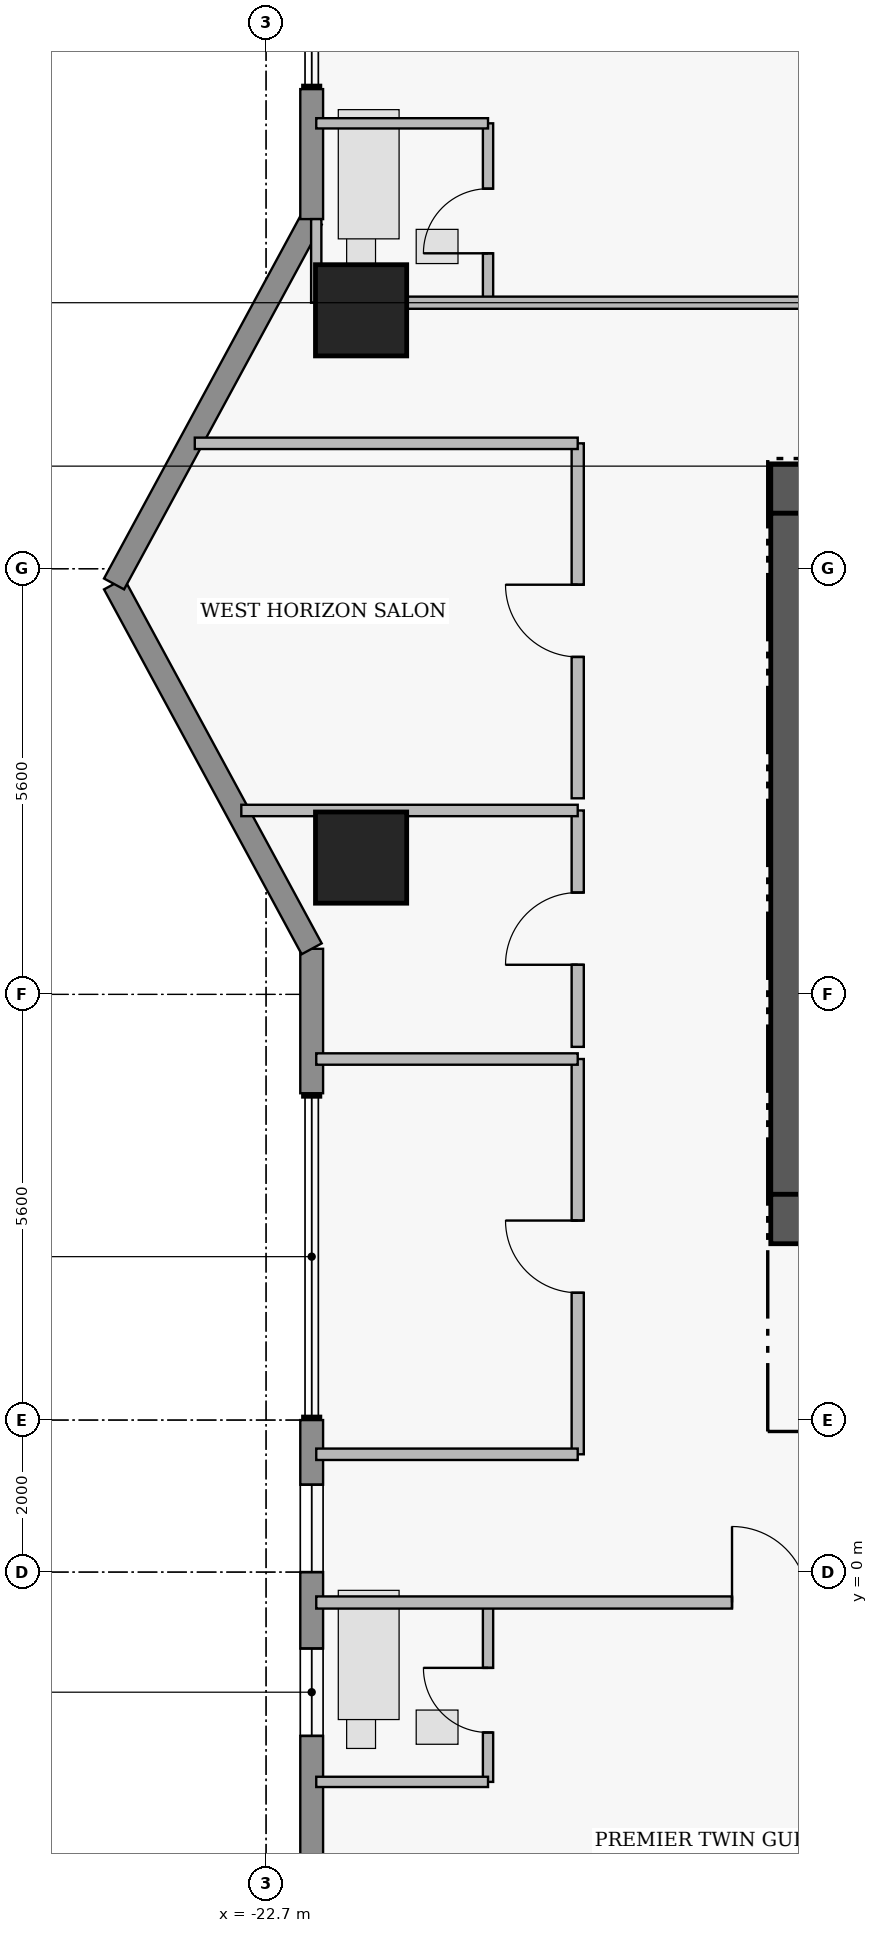
"""IFC4 building model, lengths in metres.
Left out: names, types, materials, properties, quantities, classifications, styles, units other than length and angle.
Written with IfcOpenShell. Run it as: python <this file> out.ifc"""

import sys

from ifc_helpers import new_model, si_unit, direction, frame, frame_2d, origin, origin_2d, place, context, subcontext, project, spatial, rectangle, extrude, element, fill, save


model = new_model("IFC4")
c1 = context("Model", 3, precision=1e-05, world=origin(), true_north=direction((0.0, 1.0)))
c2 = subcontext(c1, "Body", "Model", "MODEL_VIEW")
j1 = project(units=[si_unit("LENGTHUNIT", "METRE"), si_unit("PLANEANGLEUNIT", "RADIAN")], contexts=[c1])
p1 = place(None, origin())
s1 = spatial("IfcSite", under=j1, at=p1, CompositionType="ELEMENT")
p2 = place(p1, origin())
s2 = spatial("IfcBuilding", under=s1, at=p2, CompositionType="ELEMENT")
p3 = place(p2, frame((0.0, 0.0, 188.65)))
s3 = spatial("IfcBuildingStorey", under=s2, at=p3, CompositionType="ELEMENT", Elevation=188.65)
p4 = place(p3, frame((-16.06, 14.255, 0.0), z_axis=(0.0, 0.0, 1.0), x_axis=(1.0, 0.0, 0.0)))
e1 = element("IfcWall", 1, at=p4, inside=s3, PredefinedType="SHEAR", context=c2, shape_type="SweptSolid", body=[
    extrude(rectangle(XDim=4.46, YDim=0.65, at=frame_2d((2.23, 0.0))), origin(), (0.0, 0.0, 1.0), 3.56),
])
p5 = place(p3, frame((-15.735, 4.97, 0.0), z_axis=(0.0, 0.0, 1.0), x_axis=(0.0, 1.0, 0.0)))
e2 = element("IfcWall", 2, at=p5, inside=s3, PredefinedType="SHEAR", context=c2, shape_type="SweptSolid", body=[
    extrude(rectangle(XDim=8.96, YDim=0.65, at=frame_2d((4.48, 0.0))), origin(), (0.0, 0.0, 1.0), 3.56),
])
p6 = place(p3, frame((-16.06, 4.645, 0.0), z_axis=(0.0, 0.0, 1.0), x_axis=(1.0, 0.0, 0.0)))
e3 = element("IfcWall", 3, at=p6, inside=s3, PredefinedType="SHEAR", context=c2, shape_type="SweptSolid", body=[
    extrude(rectangle(XDim=4.46, YDim=0.65, at=frame_2d((2.23, 0.0))), origin(), (0.0, 0.0, 1.0), 3.56),
])
for number, where, z_axis, x_axis in (
    (4, (-21.45, 9.4, 0.0), (0.0, 0.0, 1.0), (1.0, 0.0, 0.0)),
    (5, (-21.45, 16.6, 0.0), (0.0, 0.0, 1.0), (1.0, 0.0, 0.0)),
):
    element("IfcColumn", number, at=place(p3, frame(where, z_axis=z_axis, x_axis=x_axis)), inside=s3, PredefinedType="COLUMN", context=c2, shape_type="SweptSolid", body=[
        extrude(rectangle(XDim=1.2, YDim=1.2, at=origin_2d()), origin(), (0.0, 0.0, 1.0), 3.75),
    ])
p7 = place(p3, frame((-22.1, -4.2, 0.0), z_axis=(0.0, 0.0, 1.0), x_axis=(0.0, 1.0, 0.0)))
e6 = element("IfcWall", 6, at=p7, inside=s3, PredefinedType="STANDARD", context=c2, shape_type="SweptSolid", body=[
    extrude(rectangle(XDim=6.2, YDim=0.3, at=frame_2d((3.1, 0.0))), origin(), (0.0, 0.0, 1.0), 3.53),
])
p8 = place(p7, frame((2.045, 0.0, 0.95)))
e7 = element("IfcOpeningElement", 7, at=p8, cuts=e6, PredefinedType="OPENING", context=c2, shape_type="SweptSolid", body=[
    extrude(rectangle(XDim=1.15, YDim=1.55, at=frame_2d((0.575, 0.775))), frame((0.0, 0.16, 0.0), z_axis=(0.0, -1.0, 0.0), x_axis=(1.0, 0.0, 0.0)), (0.0, 0.0, 1.0), 0.32),
])
p9 = place(p7, frame((4.2, 0.0, 0.95)))
e8 = element("IfcOpeningElement", 8, at=p9, cuts=e6, PredefinedType="OPENING", context=c2, shape_type="SweptSolid", body=[
    extrude(rectangle(XDim=1.15, YDim=1.55, at=frame_2d((0.575, 0.775))), frame((0.0, 0.16, 0.0), z_axis=(0.0, -1.0, 0.0), x_axis=(1.0, 0.0, 0.0)), (0.0, 0.0, 1.0), 0.32),
])
p10 = place(p3, frame((-22.1, 6.3, 0.0), z_axis=(0.0, 0.0, 1.0), x_axis=(0.0, 1.0, 0.0)))
e9 = element("IfcWall", 9, at=p10, inside=s3, PredefinedType="STANDARD", context=c2, shape_type="SweptSolid", body=[
    extrude(rectangle(XDim=1.9, YDim=0.3, at=frame_2d((0.95, 0.0))), origin(), (0.0, 0.0, 1.0), 3.53),
])
for number, where, z_axis, x_axis in (
    (10, (-22.1, 8.2, 0.0), (0.0, 0.0, 1.0), (-0.476, 0.879, 0.0)),
    (11, (-24.7, 13.0, 0.0), (0.0, 0.0, 1.0), (0.476, 0.879, 0.0)),
):
    element("IfcWall", number, at=place(p3, frame(where, z_axis=z_axis, x_axis=x_axis)), inside=s3, PredefinedType="STANDARD", context=c2, shape_type="SweptSolid", body=[
        extrude(rectangle(XDim=5.459, YDim=0.3, at=frame_2d((2.729, 0.0))), origin(), (0.0, 0.0, 1.0), 3.53),
    ])
p11 = place(p3, frame((-22.1, 17.8, 0.0), z_axis=(0.0, 0.0, 1.0), x_axis=(0.0, 1.0, 0.0)))
e12 = element("IfcWall", 12, at=p11, inside=s3, PredefinedType="STANDARD", context=c2, shape_type="SweptSolid", body=[
    extrude(rectangle(XDim=1.71, YDim=0.3, at=frame_2d((0.855, 0.0))), origin(), (0.0, 0.0, 1.0), 3.53),
])
p12 = place(p3, frame((-19.78, 16.7, 0.0), z_axis=(0.0, 0.0, 1.0), x_axis=(0.0, 1.0, 0.0)))
e13 = element("IfcWall", 13, at=p12, inside=s3, PredefinedType="PLUMBINGWALL", context=c2, shape_type="SweptSolid", body=[
    extrude(rectangle(XDim=2.36, YDim=0.135, at=frame_2d((1.18, 0.0))), origin(), (0.0, 0.0, 1.0), 3.53),
])
p13 = place(p12, frame((0.65, 0.0, 0.0)))
e14 = element("IfcOpeningElement", 14, at=p13, cuts=e13, PredefinedType="OPENING", context=c2, shape_type="SweptSolid", body=[
    extrude(rectangle(XDim=0.85, YDim=2.1, at=frame_2d((0.425, 1.05))), frame((0.0, 0.077, 0.0), z_axis=(0.0, -1.0, 0.0), x_axis=(1.0, 0.0, 0.0)), (0.0, 0.0, 1.0), 0.155),
])
p14 = place(p3, frame((-22.04, 16.7, 0.0), z_axis=(0.0, 0.0, 1.0), x_axis=(1.0, 0.0, 0.0)))
e15 = element("IfcWall", 15, at=p14, inside=s3, PredefinedType="PARTITIONING", context=c2, shape_type="SweptSolid", body=[
    extrude(rectangle(XDim=13.29, YDim=0.16, at=frame_2d((6.645, 0.0))), origin(), (0.0, 0.0, 1.0), 3.124),
])
p15 = place(p14, frame((7.39, 0.0, 0.0)))
e16 = element("IfcOpeningElement", 16, at=p15, cuts=e15, PredefinedType="OPENING", context=c2, shape_type="SweptSolid", body=[
    extrude(rectangle(XDim=1.0, YDim=2.15, at=frame_2d((0.5, 1.075))), frame((0.0, 0.09, 0.0), z_axis=(0.0, -1.0, 0.0), x_axis=(1.0, 0.0, 0.0)), (0.0, 0.0, 1.0), 0.18),
])
p16 = place(p3, frame((-19.78, -2.76, 0.0), z_axis=(0.0, 0.0, 1.0), x_axis=(0.0, 1.0, 0.0)))
e17 = element("IfcWall", 17, at=p16, inside=s3, PredefinedType="PLUMBINGWALL", context=c2, shape_type="SweptSolid", body=[
    extrude(rectangle(XDim=2.36, YDim=0.135, at=frame_2d((1.18, 0.0))), origin(), (0.0, 0.0, 1.0), 3.53),
])
p17 = place(p16, frame((0.65, 0.0, 0.0)))
e18 = element("IfcOpeningElement", 18, at=p17, cuts=e17, PredefinedType="OPENING", context=c2, shape_type="SweptSolid", body=[
    extrude(rectangle(XDim=0.85, YDim=2.1, at=frame_2d((0.425, 1.05))), frame((0.0, 0.077, 0.0), z_axis=(0.0, -1.0, 0.0), x_axis=(1.0, 0.0, 0.0)), (0.0, 0.0, 1.0), 0.155),
])
p18 = place(p3, frame((-22.04, -0.4, 0.0), z_axis=(0.0, 0.0, 1.0), x_axis=(1.0, 0.0, 0.0)))
e19 = element("IfcWall", 19, at=p18, inside=s3, PredefinedType="PARTITIONING", context=c2, shape_type="SweptSolid", body=[
    extrude(rectangle(XDim=9.64, YDim=0.16, at=frame_2d((4.82, 0.0))), origin(), (0.0, 0.0, 1.0), 3.53),
])
p19 = place(p18, frame((5.47, 0.0, 0.0)))
e20 = element("IfcOpeningElement", 20, at=p19, cuts=e19, PredefinedType="OPENING", context=c2, shape_type="SweptSolid", body=[
    extrude(rectangle(XDim=1.0, YDim=2.15, at=frame_2d((0.5, 1.075))), frame((0.0, 0.09, 0.0), z_axis=(0.0, -1.0, 0.0), x_axis=(1.0, 0.0, 0.0)), (0.0, 0.0, 1.0), 0.18),
])
p20 = place(p3, frame((-18.6, 1.55, 0.0), z_axis=(0.0, 0.0, 1.0), x_axis=(0.0, 1.0, 0.0)))
e21 = element("IfcWall", 21, at=p20, inside=s3, PredefinedType="PARTITIONING", context=c2, shape_type="SweptSolid", body=[
    extrude(rectangle(XDim=5.2, YDim=0.16, at=frame_2d((2.6, 0.0))), origin(), (0.0, 0.0, 1.0), 3.53),
])
p21 = place(p20, frame((2.125, 0.0, 0.0)))
e22 = element("IfcOpeningElement", 22, at=p21, cuts=e21, PredefinedType="OPENING", context=c2, shape_type="SweptSolid", body=[
    extrude(rectangle(XDim=0.95, YDim=2.15, at=frame_2d((0.475, 1.075))), frame((0.0, 0.09, 0.0), z_axis=(0.0, -1.0, 0.0), x_axis=(1.0, 0.0, 0.0)), (0.0, 0.0, 1.0), 0.18),
])
p22 = place(p3, frame((-18.6, 6.91, 0.0), z_axis=(0.0, 0.0, 1.0), x_axis=(0.0, 1.0, 0.0)))
e23 = element("IfcWall", 23, at=p22, inside=s3, PredefinedType="PARTITIONING", context=c2, shape_type="SweptSolid", body=[
    extrude(rectangle(XDim=3.11, YDim=0.16, at=frame_2d((1.555, 0.0))), origin(), (0.0, 0.0, 1.0), 3.53),
])
p23 = place(p22, frame((1.08, 0.0, 0.0)))
e24 = element("IfcOpeningElement", 24, at=p23, cuts=e23, PredefinedType="OPENING", context=c2, shape_type="SweptSolid", body=[
    extrude(rectangle(XDim=0.95, YDim=2.15, at=frame_2d((0.475, 1.075))), frame((0.0, 0.09, 0.0), z_axis=(0.0, -1.0, 0.0), x_axis=(1.0, 0.0, 0.0)), (0.0, 0.0, 1.0), 0.18),
])
p24 = place(p3, frame((-18.6, 10.18, 0.0), z_axis=(0.0, 0.0, 1.0), x_axis=(0.0, 1.0, 0.0)))
e25 = element("IfcWall", 25, at=p24, inside=s3, PredefinedType="PARTITIONING", context=c2, shape_type="SweptSolid", body=[
    extrude(rectangle(XDim=4.67, YDim=0.16, at=frame_2d((2.335, 0.0))), origin(), (0.0, 0.0, 1.0), 3.53),
])
p25 = place(p24, frame((1.86, 0.0, 0.0)))
e26 = element("IfcOpeningElement", 26, at=p25, cuts=e25, PredefinedType="OPENING", context=c2, shape_type="SweptSolid", body=[
    extrude(rectangle(XDim=0.95, YDim=2.15, at=frame_2d((0.475, 1.075))), frame((0.0, 0.09, 0.0), z_axis=(0.0, -1.0, 0.0), x_axis=(1.0, 0.0, 0.0)), (0.0, 0.0, 1.0), 0.18),
])
p26 = place(p3, frame((-22.04, 19.06, 0.0), z_axis=(0.0, 0.0, 1.0), x_axis=(1.0, 0.0, 0.0)))
e27 = element("IfcWall", 27, at=p26, inside=s3, PredefinedType="PLUMBINGWALL", context=c2, shape_type="SweptSolid", body=[
    extrude(rectangle(XDim=2.26, YDim=0.135, at=frame_2d((1.13, 0.0))), origin(), (0.0, 0.0, 1.0), 3.53),
])
p27 = place(p3, frame((-22.04, 16.7, 0.0), z_axis=(0.0, 0.0, 1.0), x_axis=(0.0, 1.0, 0.0)))
e28 = element("IfcWall", 28, at=p27, inside=s3, PredefinedType="PLUMBINGWALL", context=c2, shape_type="SweptSolid", body=[
    extrude(rectangle(XDim=1.1, YDim=0.135, at=frame_2d((0.55, 0.0))), origin(), (0.0, 0.0, 1.0), 3.53),
])
p28 = place(p3, frame((-22.04, -2.76, 0.0), z_axis=(0.0, 0.0, 1.0), x_axis=(1.0, 0.0, 0.0)))
e29 = element("IfcWall", 29, at=p28, inside=s3, PredefinedType="PLUMBINGWALL", context=c2, shape_type="SweptSolid", body=[
    extrude(rectangle(XDim=2.26, YDim=0.135, at=frame_2d((1.13, 0.0))), origin(), (0.0, 0.0, 1.0), 3.53),
])
for number, where, z_axis, x_axis in (
    (30, (-22.04, 1.55, 0.0), (0.0, 0.0, 1.0), (1.0, 0.0, 0.0)),
    (31, (-22.04, 6.75, 0.0), (0.0, 0.0, 1.0), (1.0, 0.0, 0.0)),
):
    element("IfcWall", number, at=place(p3, frame(where, z_axis=z_axis, x_axis=x_axis)), inside=s3, PredefinedType="PARTITIONING", context=c2, shape_type="SweptSolid", body=[
        extrude(rectangle(XDim=3.44, YDim=0.15, at=frame_2d((1.72, 0.0))), origin(), (0.0, 0.0, 1.0), 3.53),
    ])
p29 = place(p3, frame((-23.026, 10.02, 0.0), z_axis=(0.0, 0.0, 1.0), x_axis=(1.0, 0.0, 0.0)))
e32 = element("IfcWall", 32, at=p29, inside=s3, PredefinedType="PARTITIONING", context=c2, shape_type="SweptSolid", body=[
    extrude(rectangle(XDim=4.426, YDim=0.15, at=frame_2d((2.213, 0.0))), origin(), (0.0, 0.0, 1.0), 3.53),
])
p30 = place(p3, frame((-23.638, 14.85, 0.0), z_axis=(0.0, 0.0, 1.0), x_axis=(1.0, 0.0, 0.0)))
e33 = element("IfcWall", 33, at=p30, inside=s3, PredefinedType="PARTITIONING", context=c2, shape_type="SweptSolid", body=[
    extrude(rectangle(XDim=5.038, YDim=0.15, at=frame_2d((2.519, 0.0))), origin(), (0.0, 0.0, 1.0), 3.53),
])
p31 = place(p8, origin())
e34 = element("IfcWindow", 34, at=p31, inside=s3, PartitioningType="SINGLE_PANEL", PredefinedType="WINDOW", context=c2, shape_type="SweptSolid", body=[
    extrude(rectangle(XDim=1.15, YDim=1.55, at=frame_2d((0.575, 0.775))), frame((0.0, 0.03, 0.0), z_axis=(0.0, -1.0, 0.0), x_axis=(1.0, 0.0, 0.0)), (0.0, 0.0, 1.0), 0.06),
])
fill(e7, e34)
p32 = place(p9, origin())
e35 = element("IfcWindow", 35, at=p32, inside=s3, PartitioningType="SINGLE_PANEL", PredefinedType="WINDOW", context=c2, shape_type="SweptSolid", body=[
    extrude(rectangle(XDim=1.15, YDim=1.55, at=frame_2d((0.575, 0.775))), frame((0.0, 0.03, 0.0), z_axis=(0.0, -1.0, 0.0), x_axis=(1.0, 0.0, 0.0)), (0.0, 0.0, 1.0), 0.06),
])
fill(e8, e35)
p33 = place(p13, origin())
e36 = element("IfcDoor", 36, at=p33, inside=s3, OperationType="SINGLE_SWING_LEFT", PredefinedType="DOOR", context=c2, shape_type="SweptSolid", body=[
    extrude(rectangle(XDim=0.85, YDim=2.1, at=frame_2d((0.425, 1.05))), frame((0.0, 0.025, 0.0), z_axis=(0.0, -1.0, 0.0), x_axis=(1.0, 0.0, 0.0)), (0.0, 0.0, 1.0), 0.05),
])
fill(e14, e36)
p34 = place(p17, origin())
e37 = element("IfcDoor", 37, at=p34, inside=s3, OperationType="SINGLE_SWING_RIGHT", PredefinedType="DOOR", context=c2, shape_type="SweptSolid", body=[
    extrude(rectangle(XDim=0.85, YDim=2.1, at=frame_2d((0.425, 1.05))), frame((0.0, 0.025, 0.0), z_axis=(0.0, -1.0, 0.0), x_axis=(1.0, 0.0, 0.0)), (0.0, 0.0, 1.0), 0.05),
])
fill(e18, e37)
p35 = place(p19, origin())
e38 = element("IfcDoor", 38, at=p35, inside=s3, OperationType="SINGLE_SWING_LEFT", PredefinedType="DOOR", context=c2, shape_type="SweptSolid", body=[
    extrude(rectangle(XDim=1.0, YDim=2.15, at=frame_2d((0.5, 1.075))), frame((0.0, 0.025, 0.0), z_axis=(0.0, -1.0, 0.0), x_axis=(1.0, 0.0, 0.0)), (0.0, 0.0, 1.0), 0.05),
])
fill(e20, e38)
p36 = place(p21, origin())
e39 = element("IfcDoor", 39, at=p36, inside=s3, OperationType="SINGLE_SWING_RIGHT", PredefinedType="DOOR", context=c2, shape_type="SweptSolid", body=[
    extrude(rectangle(XDim=0.95, YDim=2.15, at=frame_2d((0.475, 1.075))), frame((0.0, 0.025, 0.0), z_axis=(0.0, -1.0, 0.0), x_axis=(1.0, 0.0, 0.0)), (0.0, 0.0, 1.0), 0.05),
])
fill(e22, e39)
p37 = place(p23, origin())
e40 = element("IfcDoor", 40, at=p37, inside=s3, OperationType="SINGLE_SWING_LEFT", PredefinedType="DOOR", context=c2, shape_type="SweptSolid", body=[
    extrude(rectangle(XDim=0.95, YDim=2.15, at=frame_2d((0.475, 1.075))), frame((0.0, 0.025, 0.0), z_axis=(0.0, -1.0, 0.0), x_axis=(1.0, 0.0, 0.0)), (0.0, 0.0, 1.0), 0.05),
])
fill(e24, e40)
p38 = place(p25, origin())
e41 = element("IfcDoor", 41, at=p38, inside=s3, OperationType="SINGLE_SWING_RIGHT", PredefinedType="DOOR", context=c2, shape_type="SweptSolid", body=[
    extrude(rectangle(XDim=0.95, YDim=2.15, at=frame_2d((0.475, 1.075))), frame((0.0, 0.025, 0.0), z_axis=(0.0, -1.0, 0.0), x_axis=(1.0, 0.0, 0.0)), (0.0, 0.0, 1.0), 0.05),
])
fill(e26, e41)
save(model, sys.argv[1])
